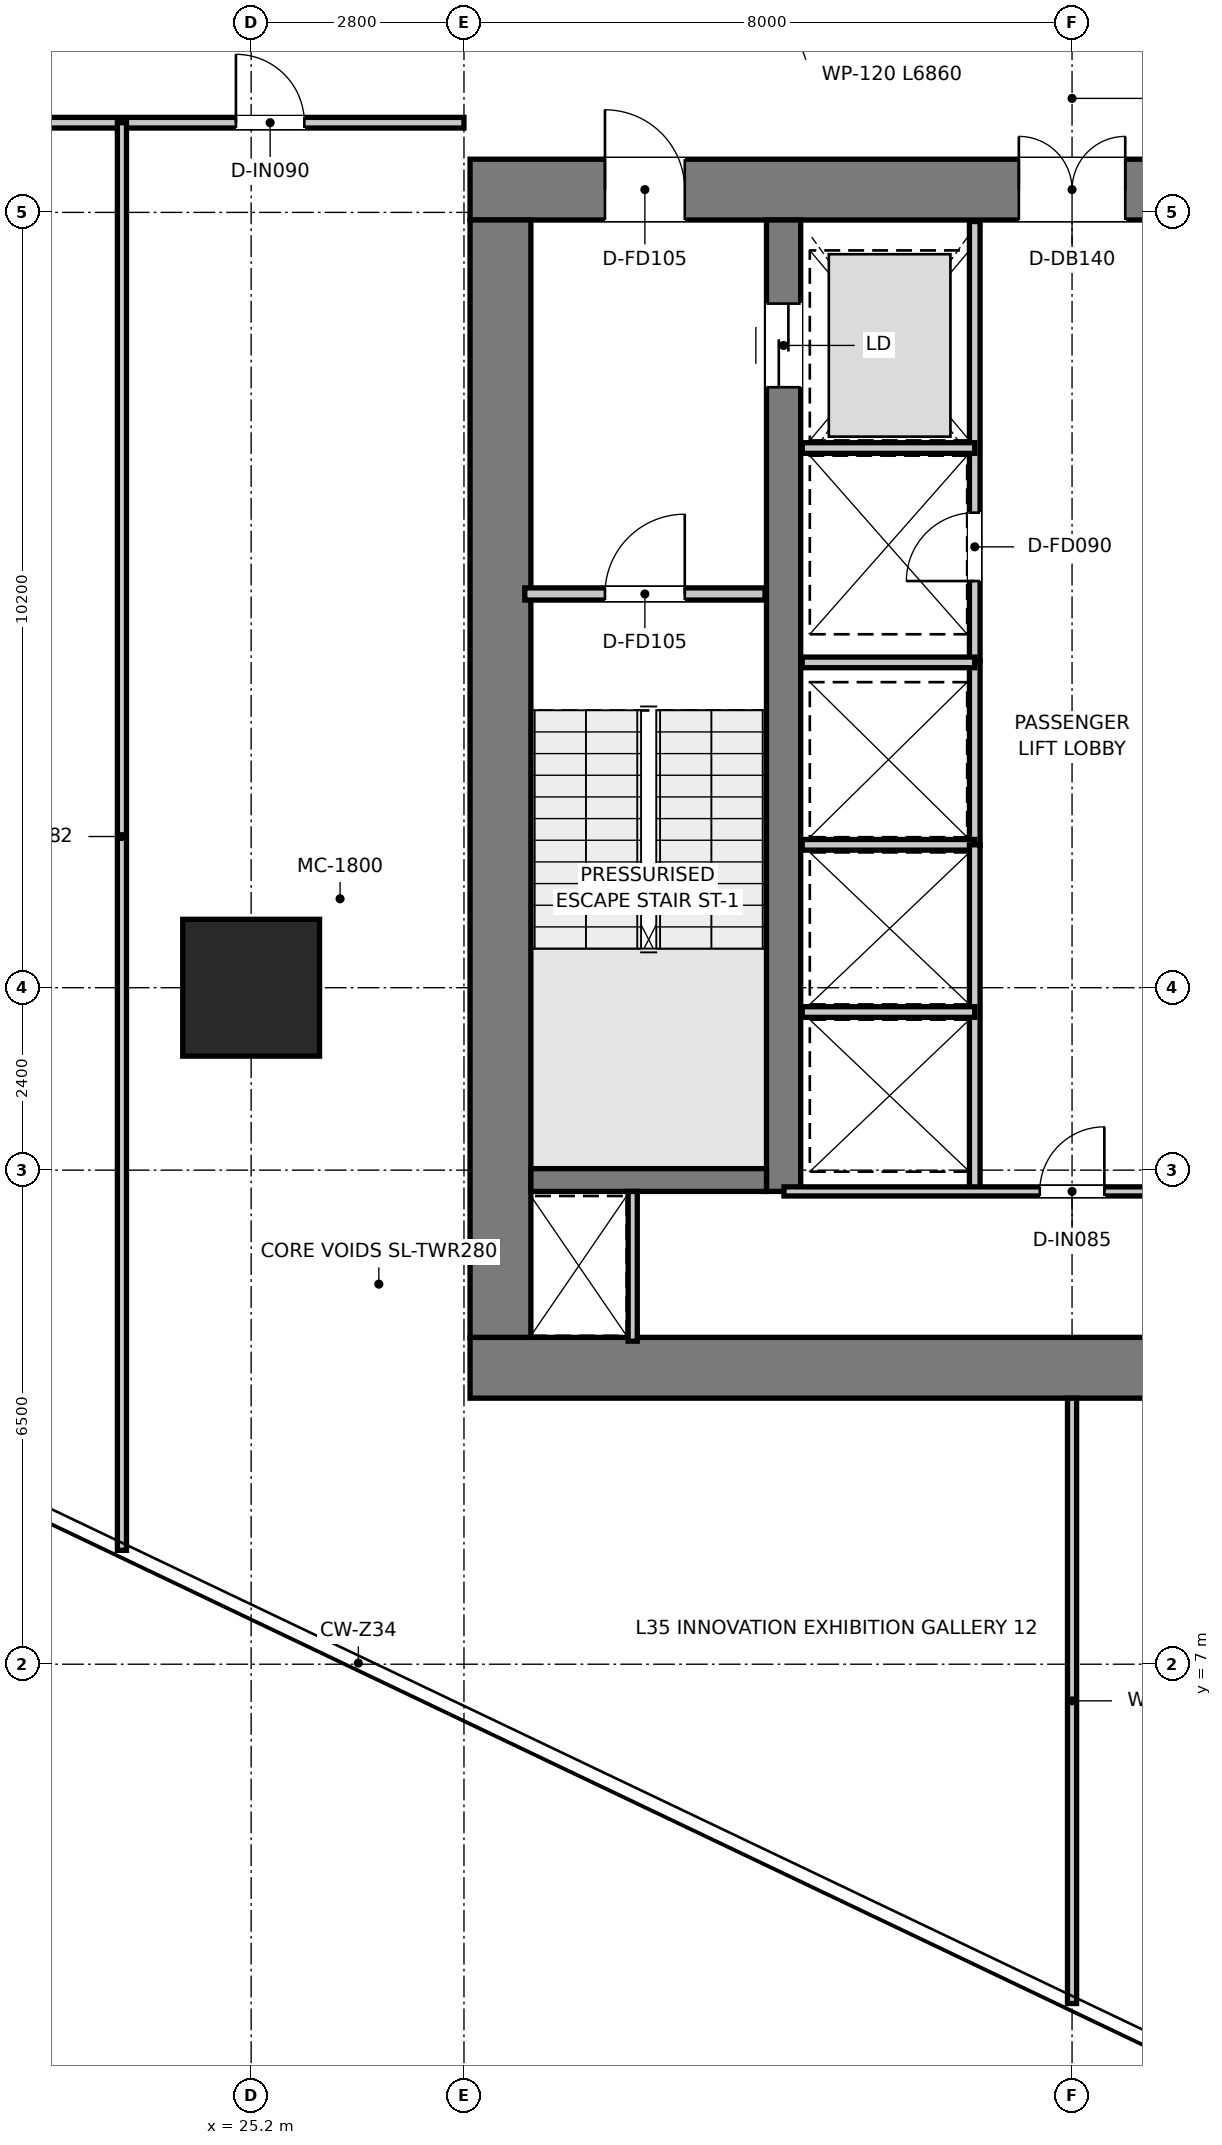
"""IFC4 building model, lengths in metres.
Left out: names, types, materials, properties, quantities, classifications, styles, units other than length and angle.
Written with IfcOpenShell. Run it as: python <this file> out.ifc"""

import sys

from ifc_helpers import new_model, si_unit, direction, frame, frame_2d, origin, origin_2d, place, context, subcontext, project, spatial, rectangle, extrude, source, transform, mapped, element, fill, save


model = new_model("IFC4")
c1 = context("Model", 3, precision=1e-05, world=origin(), true_north=direction((0.0, 1.0)))
c2 = subcontext(c1, "Body", "Model", "MODEL_VIEW")
j1 = project(units=[si_unit("LENGTHUNIT", "METRE"), si_unit("PLANEANGLEUNIT", "RADIAN")], contexts=[c1])
p1 = place(None, origin())
s1 = spatial("IfcSite", under=j1, at=p1, CompositionType="ELEMENT")
p2 = place(p1, origin())
s2 = spatial("IfcBuilding", under=s1, at=p2, CompositionType="ELEMENT")
p3 = place(p2, frame((0.0, 0.0, 146.2)))
s3 = spatial("IfcBuildingStorey", under=s2, at=p3, CompositionType="ELEMENT", Elevation=146.2)
p4 = place(p3, frame((28.08, 10.9, 0.0), z_axis=(0.0, 0.0, 1.0), x_axis=(1.0, 0.0, 0.0)))
e1 = element("IfcWall", 1, at=p4, inside=s3, PredefinedType="SHEAR", context=c2, shape_type="SweptSolid", body=[
    extrude(rectangle(XDim=15.84, YDim=0.8, at=frame_2d((7.92, 0.0))), origin(), (0.0, 0.0, 1.0), 3.95),
])
p5 = place(p3, frame((28.08, 26.4, 0.0), z_axis=(0.0, 0.0, 1.0), x_axis=(1.0, 0.0, 0.0)))
e2 = element("IfcWall", 2, at=p5, inside=s3, PredefinedType="SHEAR", context=c2, shape_type="SweptSolid", body=[
    extrude(rectangle(XDim=15.84, YDim=0.8, at=frame_2d((7.92, 0.0))), origin(), (0.0, 0.0, 1.0), 3.95),
])
p6 = place(p5, frame((7.22, 0.0, 0.0)))
e3 = element("IfcOpeningElement", 3, at=p6, cuts=e2, PredefinedType="OPENING", context=c2, shape_type="SweptSolid", body=[
    extrude(rectangle(XDim=1.4, YDim=2.2, at=frame_2d((0.7, 1.1))), frame((0.0, 0.41, 0.0), z_axis=(0.0, -1.0, 0.0), x_axis=(1.0, 0.0, 0.0)), (0.0, 0.0, 1.0), 0.82),
])
p7 = place(p5, frame((1.775, 0.0, 0.0)))
e4 = element("IfcOpeningElement", 4, at=p7, cuts=e2, PredefinedType="OPENING", context=c2, shape_type="SweptSolid", body=[
    extrude(rectangle(XDim=1.05, YDim=2.1, at=frame_2d((0.525, 1.05))), frame((0.0, 0.41, 0.0), z_axis=(0.0, -1.0, 0.0), x_axis=(1.0, 0.0, 0.0)), (0.0, 0.0, 1.0), 0.82),
])
p8 = place(p5, frame((13.015, 0.0, 0.0)))
e5 = element("IfcOpeningElement", 5, at=p8, cuts=e2, PredefinedType="OPENING", context=c2, shape_type="SweptSolid", body=[
    extrude(rectangle(XDim=1.05, YDim=2.1, at=frame_2d((0.525, 1.05))), frame((0.0, 0.41, 0.0), z_axis=(0.0, -1.0, 0.0), x_axis=(1.0, 0.0, 0.0)), (0.0, 0.0, 1.0), 0.82),
])
p9 = place(p3, frame((28.48, 11.3, 0.0), z_axis=(0.0, 0.0, 1.0), x_axis=(0.0, 1.0, 0.0)))
e6 = element("IfcWall", 6, at=p9, inside=s3, PredefinedType="SHEAR", context=c2, shape_type="SweptSolid", body=[
    extrude(rectangle(XDim=14.7, YDim=0.8, at=frame_2d((7.35, 0.0))), origin(), (0.0, 0.0, 1.0), 3.95),
])
p10 = place(p3, frame((32.205, 13.22, 0.0), z_axis=(0.0, 0.0, 1.0), x_axis=(0.0, 1.0, 0.0)))
e7 = element("IfcWall", 7, at=p10, inside=s3, PredefinedType="SHEAR", context=c2, shape_type="SweptSolid", body=[
    extrude(rectangle(XDim=12.78, YDim=0.45, at=frame_2d((6.39, 0.0))), origin(), (0.0, 0.0, 1.0), 3.95),
])
p11 = place(p10, frame((10.58, 0.0, 0.0)))
e8 = element("IfcOpeningElement", 8, at=p11, cuts=e7, PredefinedType="OPENING", context=c2, shape_type="SweptSolid", body=[
    extrude(rectangle(XDim=1.1, YDim=2.15, at=frame_2d((0.55, 1.075))), frame((0.0, 0.235, 0.0), z_axis=(0.0, -1.0, 0.0), x_axis=(1.0, 0.0, 0.0)), (0.0, 0.0, 1.0), 0.47),
])
p12 = place(p3, frame((28.88, 13.37, 0.0), z_axis=(0.0, 0.0, 1.0), x_axis=(1.0, 0.0, 0.0)))
e9 = element("IfcWall", 9, at=p12, inside=s3, PredefinedType="SHEAR", context=c2, shape_type="SweptSolid", body=[
    extrude(rectangle(XDim=3.1, YDim=0.3, at=frame_2d((1.55, 0.0))), origin(), (0.0, 0.0, 1.0), 3.95),
])
m1 = source(origin(), c2, "Body", "SweptSolid", [
    extrude(rectangle(XDim=1.8, YDim=1.8, at=origin_2d()), origin(), (0.0, 0.0, 1.0), 3.95),
])
p13 = place(p3, frame((25.2, 15.9, 0.0), z_axis=(0.0, 0.0, 1.0), x_axis=(1.0, 0.0, 0.0)))
e10 = element("IfcColumn", 10, at=p13, inside=s3, PredefinedType="USERDEFINED", context=c2, shape_type="MappedRepresentation", body=[
    mapped(m1, transform((0.0, 0.0, 0.0), x_axis=(1.0, 0.0, 0.0), y_axis=(0.0, 1.0, 0.0), z_axis=(0.0, 0.0, 1.0), scale=1.0)),
])
p14 = place(p3, frame((28.8, 21.08, 0.0), z_axis=(0.0, 0.0, 1.0), x_axis=(1.0, 0.0, 0.0)))
e11 = element("IfcWall", 11, at=p14, inside=s3, PredefinedType="PARTITIONING", context=c2, shape_type="SweptSolid", body=[
    extrude(rectangle(XDim=3.16, YDim=0.16, at=frame_2d((1.58, 0.0))), origin(), (0.0, 0.0, 1.0), 3.67),
])
p15 = place(p14, frame((1.055, 0.0, 0.0)))
e12 = element("IfcOpeningElement", 12, at=p15, cuts=e11, PredefinedType="OPENING", context=c2, shape_type="SweptSolid", body=[
    extrude(rectangle(XDim=1.05, YDim=2.1, at=frame_2d((0.525, 1.05))), frame((0.0, 0.09, 0.0), z_axis=(0.0, -1.0, 0.0), x_axis=(1.0, 0.0, 0.0)), (0.0, 0.0, 1.0), 0.18),
])
p16 = place(p3, frame((34.72, 20.2, 0.0), z_axis=(0.0, 0.0, 1.0), x_axis=(0.0, 1.0, 0.0)))
e13 = element("IfcWall", 13, at=p16, inside=s3, PredefinedType="PARTITIONING", context=c2, shape_type="SweptSolid", body=[
    extrude(rectangle(XDim=5.78, YDim=0.14, at=frame_2d((2.89, 0.0))), origin(), (0.0, 0.0, 1.0), 2.67),
])
p17 = place(p16, frame((1.05, 0.0, 0.0)))
e14 = element("IfcOpeningElement", 14, at=p17, cuts=e13, PredefinedType="OPENING", context=c2, shape_type="SweptSolid", body=[
    extrude(rectangle(XDim=0.9, YDim=2.1, at=frame_2d((0.45, 1.05))), frame((0.0, 0.08, 0.0), z_axis=(0.0, -1.0, 0.0), x_axis=(1.0, 0.0, 0.0)), (0.0, 0.0, 1.0), 0.16),
])
p18 = place(p3, frame((32.45, 23.0, 0.0), z_axis=(0.0, 0.0, 1.0), x_axis=(1.0, 0.0, 0.0)))
e15 = element("IfcWall", 15, at=p18, inside=s3, PredefinedType="PARTITIONING", context=c2, shape_type="SweptSolid", body=[
    extrude(rectangle(XDim=2.27, YDim=0.14, at=frame_2d((1.135, 0.0))), origin(), (0.0, 0.0, 1.0), 2.67),
])
p19 = place(p3, frame((34.72, 17.78, 0.0), z_axis=(0.0, 0.0, 1.0), x_axis=(0.0, 1.0, 0.0)))
e16 = element("IfcWall", 16, at=p19, inside=s3, PredefinedType="PARTITIONING", context=c2, shape_type="SweptSolid", body=[
    extrude(rectangle(XDim=2.42, YDim=0.14, at=frame_2d((1.21, 0.0))), origin(), (0.0, 0.0, 1.0), 3.67),
])
for number, where, z_axis, x_axis in (
    (17, (32.45, 17.78, 0.0), (0.0, 0.0, 1.0), (1.0, 0.0, 0.0)),
    (18, (32.45, 20.18, 0.0), (0.0, 0.0, 1.0), (1.0, 0.0, 0.0)),
):
    element("IfcWall", number, at=place(p3, frame(where, z_axis=z_axis, x_axis=x_axis)), inside=s3, PredefinedType="PARTITIONING", context=c2, shape_type="SweptSolid", body=[
        extrude(rectangle(XDim=2.27, YDim=0.14, at=frame_2d((1.135, 0.0))), origin(), (0.0, 0.0, 1.0), 3.67),
    ])
p20 = place(p3, frame((34.72, 13.22, 0.0), z_axis=(0.0, 0.0, 1.0), x_axis=(0.0, 1.0, 0.0)))
e19 = element("IfcWall", 19, at=p20, inside=s3, PredefinedType="PARTITIONING", context=c2, shape_type="SweptSolid", body=[
    extrude(rectangle(XDim=4.56, YDim=0.14, at=frame_2d((2.28, 0.0))), origin(), (0.0, 0.0, 1.0), 3.67),
])
p21 = place(p3, frame((32.45, 15.58, 0.0), z_axis=(0.0, 0.0, 1.0), x_axis=(1.0, 0.0, 0.0)))
e20 = element("IfcWall", 20, at=p21, inside=s3, PredefinedType="PARTITIONING", context=c2, shape_type="SweptSolid", body=[
    extrude(rectangle(XDim=2.27, YDim=0.14, at=frame_2d((1.135, 0.0))), origin(), (0.0, 0.0, 1.0), 3.67),
])
p22 = place(p3, frame((30.22, 11.25, 0.0), z_axis=(0.0, 0.0, 1.0), x_axis=(0.0, 1.0, 0.0)))
e21 = element("IfcWall", 21, at=p22, inside=s3, PredefinedType="PARTITIONING", context=c2, shape_type="SweptSolid", body=[
    extrude(rectangle(XDim=1.97, YDim=0.12, at=frame_2d((0.985, 0.0))), origin(), (0.0, 0.0, 1.0), 3.67),
])
p23 = place(p3, frame((32.21, 13.22, 0.0), z_axis=(0.0, 0.0, 1.0), x_axis=(1.0, 0.0, 0.0)))
e22 = element("IfcWall", 22, at=p23, inside=s3, PredefinedType="PARTITIONING", context=c2, shape_type="SweptSolid", body=[
    extrude(rectangle(XDim=7.58, YDim=0.12, at=frame_2d((3.79, 0.0))), origin(), (0.0, 0.0, 1.0), 3.67),
])
p24 = place(p23, frame((3.365, 0.0, 0.0)))
e23 = element("IfcOpeningElement", 23, at=p24, cuts=e22, PredefinedType="OPENING", context=c2, shape_type="SweptSolid", body=[
    extrude(rectangle(XDim=0.85, YDim=2.1, at=frame_2d((0.425, 1.05))), frame((0.0, 0.07, 0.0), z_axis=(0.0, -1.0, 0.0), x_axis=(1.0, 0.0, 0.0)), (0.0, 0.0, 1.0), 0.14),
])
p25 = place(p3, frame((12.113, 27.28, 0.0), z_axis=(0.0, 0.0, 1.0), x_axis=(1.0, 0.0, 0.0)))
e24 = element("IfcWall", 24, at=p25, inside=s3, PredefinedType="PARTITIONING", context=c2, shape_type="SweptSolid", body=[
    extrude(rectangle(XDim=15.887, YDim=0.14, at=frame_2d((7.944, 0.0))), origin(), (0.0, 0.0, 1.0), 3.03),
])
p26 = place(p25, frame((4.105, 0.0, 0.0)))
e25 = element("IfcOpeningElement", 25, at=p26, cuts=e24, PredefinedType="OPENING", context=c2, shape_type="SweptSolid", body=[
    extrude(rectangle(XDim=0.9, YDim=2.1, at=frame_2d((0.45, 1.05))), frame((0.0, 0.08, 0.0), z_axis=(0.0, -1.0, 0.0), x_axis=(1.0, 0.0, 0.0)), (0.0, 0.0, 1.0), 0.16),
])
p27 = place(p25, frame((12.887, 0.0, 0.0)))
e26 = element("IfcOpeningElement", 26, at=p27, cuts=e24, PredefinedType="OPENING", context=c2, shape_type="SweptSolid", body=[
    extrude(rectangle(XDim=0.9, YDim=2.1, at=frame_2d((0.45, 1.05))), frame((0.0, 0.08, 0.0), z_axis=(0.0, -1.0, 0.0), x_axis=(1.0, 0.0, 0.0)), (0.0, 0.0, 1.0), 0.16),
])
p28 = place(p3, frame((36.0, 2.536, 0.0), z_axis=(0.0, 0.0, 1.0), x_axis=(0.0, 1.0, 0.0)))
e27 = element("IfcWall", 27, at=p28, inside=s3, PredefinedType="PARTITIONING", context=c2, shape_type="SweptSolid", body=[
    extrude(rectangle(XDim=7.964, YDim=0.12, at=frame_2d((3.982, 0.0))), origin(), (0.0, 0.0, 1.0), 3.67),
])
p29 = place(p3, frame((23.5, 8.498, 0.0), z_axis=(0.0, 0.0, 1.0), x_axis=(0.0, 1.0, 0.0)))
e28 = element("IfcWall", 28, at=p29, inside=s3, PredefinedType="PARTITIONING", context=c2, shape_type="SweptSolid", body=[
    extrude(rectangle(XDim=18.782, YDim=0.12, at=frame_2d((9.391, 0.0))), origin(), (0.0, 0.0, 1.0), 3.08),
])
p30 = place(p15, origin())
e29 = element("IfcDoor", 29, at=p30, inside=s3, OperationType="SINGLE_SWING_RIGHT", PredefinedType="DOOR", context=c2, shape_type="SweptSolid", body=[
    extrude(rectangle(XDim=1.05, YDim=2.1, at=frame_2d((0.525, 1.05))), frame((0.0, 0.025, 0.0), z_axis=(0.0, -1.0, 0.0), x_axis=(1.0, 0.0, 0.0)), (0.0, 0.0, 1.0), 0.05),
])
fill(e12, e29)
p31 = place(p6, origin())
e30 = element("IfcDoor", 30, at=p31, inside=s3, OperationType="DOUBLE_DOOR_SINGLE_SWING", PredefinedType="DOOR", context=c2, shape_type="SweptSolid", body=[
    extrude(rectangle(XDim=1.4, YDim=2.2, at=frame_2d((0.7, 1.1))), frame((0.0, 0.025, 0.0), z_axis=(0.0, -1.0, 0.0), x_axis=(1.0, 0.0, 0.0)), (0.0, 0.0, 1.0), 0.05),
])
fill(e3, e30)
p32 = place(p7, origin())
e31 = element("IfcDoor", 31, at=p32, inside=s3, OperationType="SINGLE_SWING_LEFT", PredefinedType="DOOR", context=c2, shape_type="SweptSolid", body=[
    extrude(rectangle(XDim=1.05, YDim=2.1, at=frame_2d((0.525, 1.05))), frame((0.0, 0.025, 0.0), z_axis=(0.0, -1.0, 0.0), x_axis=(1.0, 0.0, 0.0)), (0.0, 0.0, 1.0), 0.05),
])
fill(e4, e31)
p33 = place(p11, origin())
e32 = element("IfcDoor", 32, at=p33, inside=s3, OperationType="DOUBLE_DOOR_SLIDING", PredefinedType="DOOR", context=c2, shape_type="SweptSolid", body=[
    extrude(rectangle(XDim=1.1, YDim=2.15, at=frame_2d((0.55, 1.075))), frame((0.0, 0.025, 0.0), z_axis=(0.0, -1.0, 0.0), x_axis=(1.0, 0.0, 0.0)), (0.0, 0.0, 1.0), 0.05),
])
fill(e8, e32)
p34 = place(p17, origin())
e33 = element("IfcDoor", 33, at=p34, inside=s3, OperationType="SINGLE_SWING_LEFT", PredefinedType="DOOR", context=c2, shape_type="SweptSolid", body=[
    extrude(rectangle(XDim=0.9, YDim=2.1, at=frame_2d((0.45, 1.05))), frame((0.0, 0.025, 0.0), z_axis=(0.0, -1.0, 0.0), x_axis=(1.0, 0.0, 0.0)), (0.0, 0.0, 1.0), 0.05),
])
fill(e14, e33)
p35 = place(p24, origin())
e34 = element("IfcDoor", 34, at=p35, inside=s3, OperationType="SINGLE_SWING_RIGHT", PredefinedType="DOOR", context=c2, shape_type="SweptSolid", body=[
    extrude(rectangle(XDim=0.85, YDim=2.1, at=frame_2d((0.425, 1.05))), frame((0.0, 0.025, 0.0), z_axis=(0.0, -1.0, 0.0), x_axis=(1.0, 0.0, 0.0)), (0.0, 0.0, 1.0), 0.05),
])
fill(e23, e34)
p36 = place(p27, origin())
e35 = element("IfcDoor", 35, at=p36, inside=s3, OperationType="SINGLE_SWING_LEFT", PredefinedType="DOOR", context=c2, shape_type="SweptSolid", body=[
    extrude(rectangle(XDim=0.9, YDim=2.1, at=frame_2d((0.45, 1.05))), frame((0.0, 0.025, 0.0), z_axis=(0.0, -1.0, 0.0), x_axis=(1.0, 0.0, 0.0)), (0.0, 0.0, 1.0), 0.05),
])
fill(e26, e35)
save(model, sys.argv[1])
